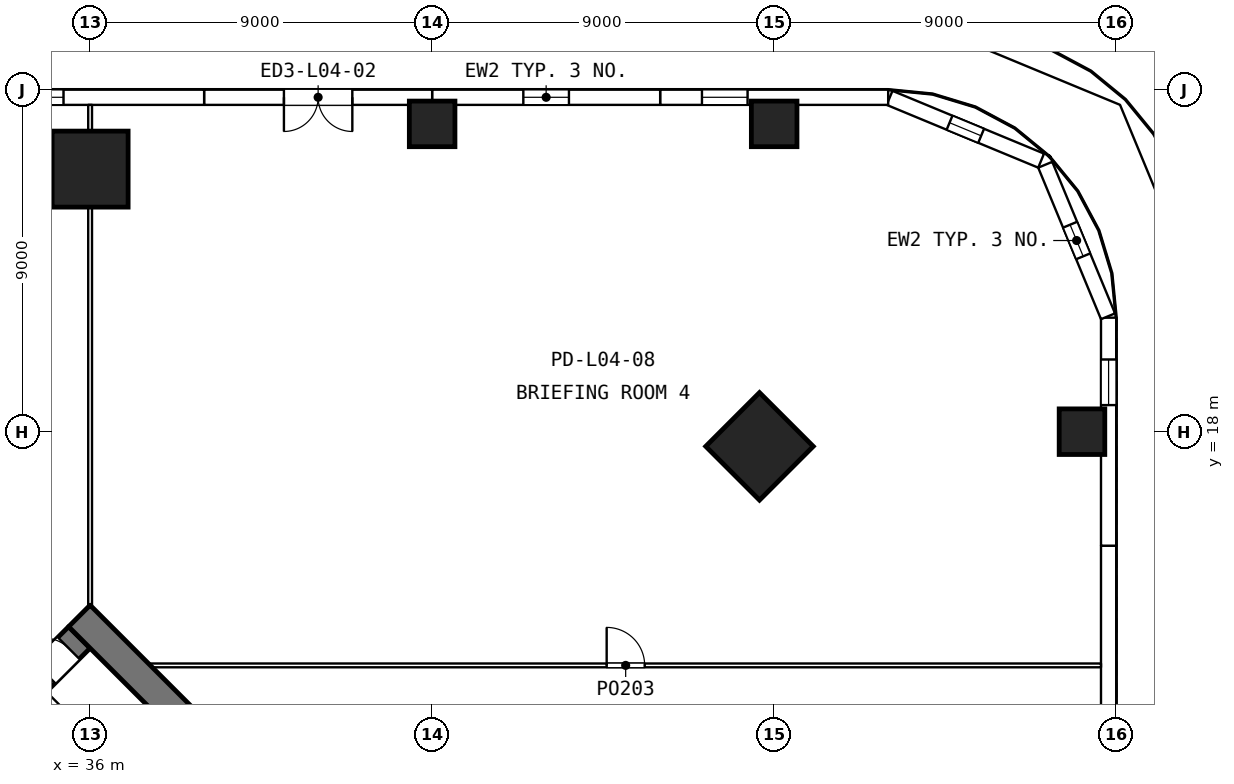
"""IFC4 building model, lengths in metres.
Left out: names, types, materials, properties, quantities, classifications, styles, units other than length and angle.
Written with IfcOpenShell. Run it as: python <this file> out.ifc"""

import sys

from ifc_helpers import new_model, si_unit, direction, frame, frame_2d, origin, origin_2d, place, context, subcontext, project, spatial, rectangle, extrude, element, fill, save


model = new_model("IFC4")
c1 = context("Model", 3, precision=1e-05, world=origin(), true_north=direction((0.0, 1.0)))
c2 = subcontext(c1, "Body", "Model", "MODEL_VIEW")
j1 = project(units=[si_unit("LENGTHUNIT", "METRE"), si_unit("PLANEANGLEUNIT", "RADIAN")], contexts=[c1])
p1 = place(None, origin())
s1 = spatial("IfcSite", under=j1, at=p1, CompositionType="ELEMENT")
p2 = place(p1, origin())
s2 = spatial("IfcBuilding", under=s1, at=p2, CompositionType="ELEMENT")
p3 = place(p2, frame((0.0, 0.0, 22.8)))
s3 = spatial("IfcBuildingStorey", under=s2, at=p3, CompositionType="ELEMENT", Elevation=22.8)
for number, where, z_axis, x_axis in (
    (1, (45.0, 26.1, 0.0), (0.0, 0.0, 1.0), (1.0, 0.0, 0.0)),
    (2, (54.0, 26.1, 0.0), (0.0, 0.0, 1.0), (1.0, 0.0, 0.0)),
    (3, (62.1, 18.0, 0.0), (0.0, 0.0, 1.0), (1.0, 0.0, 0.0)),
):
    element("IfcColumn", number, at=place(p3, frame(where, z_axis=z_axis, x_axis=x_axis)), inside=s3, PredefinedType="COLUMN", context=c2, shape_type="SweptSolid", body=[
        extrude(rectangle(XDim=1.2, YDim=1.2, at=origin_2d()), origin(), (0.0, 0.0, 1.0), 4.8),
    ])
for number, where, z_axis, x_axis in (
    (4, (53.614, 17.614, 0.0), (0.0, 0.0, 1.0), (0.707, 0.707, 0.0)),
    (5, (36.0, 24.91, 0.0), (0.0, 0.0, 1.0), (0.0, 1.0, 0.0)),
):
    element("IfcColumn", number, at=place(p3, frame(where, z_axis=z_axis, x_axis=x_axis)), inside=s3, PredefinedType="COLUMN", context=c2, shape_type="SweptSolid", body=[
        extrude(rectangle(XDim=2.0, YDim=2.0, at=origin_2d()), origin(), (0.0, 0.0, 1.0), 4.8),
    ])
p4 = place(p3, frame((62.8, 9.0, 0.0), z_axis=(0.0, 0.0, 1.0), x_axis=(0.0, 1.0, 0.0)))
e6 = element("IfcWall", 6, at=p4, inside=s3, PredefinedType="SOLIDWALL", context=c2, shape_type="SweptSolid", body=[
    extrude(rectangle(XDim=6.0, YDim=0.4, at=frame_2d((3.0, 0.0))), origin(), (0.0, 0.0, 1.0), 4.5),
])
p5 = place(p3, frame((62.8, 15.0, 0.0), z_axis=(0.0, 0.0, 1.0), x_axis=(0.0, 1.0, 0.0)))
e7 = element("IfcWall", 7, at=p5, inside=s3, PredefinedType="SOLIDWALL", context=c2, shape_type="SweptSolid", body=[
    extrude(rectangle(XDim=6.0, YDim=0.4, at=frame_2d((3.0, 0.0))), origin(), (0.0, 0.0, 1.0), 4.5),
])
p6 = place(p5, frame((3.7, 0.0, 1.1)))
e8 = element("IfcOpeningElement", 8, at=p6, cuts=e7, PredefinedType="OPENING", context=c2, shape_type="SweptSolid", body=[
    extrude(rectangle(XDim=1.2, YDim=1.8, at=frame_2d((0.6, 0.9))), frame((0.0, 0.21, 0.0), z_axis=(0.0, -1.0, 0.0), x_axis=(1.0, 0.0, 0.0)), (0.0, 0.0, 1.0), 0.42),
])
p7 = place(p3, frame((62.785, 21.037, 0.0), z_axis=(0.0, 0.0, 1.0), x_axis=(-0.382743086333, 0.923854820772, 0.0)))
e9 = element("IfcWall", 9, at=p7, inside=s3, PredefinedType="SOLIDWALL", context=c2, shape_type="SweptSolid", body=[
    extrude(rectangle(XDim=4.316, YDim=0.4, at=frame_2d((2.158, 0.0))), origin(), (0.0, 0.0, 1.0), 4.5),
])
p8 = place(p7, frame((1.708, 0.0, 1.0)))
e10 = element("IfcOpeningElement", 10, at=p8, cuts=e9, PredefinedType="OPENING", context=c2, shape_type="SweptSolid", body=[
    extrude(rectangle(XDim=0.9, YDim=2.4, at=frame_2d((0.45, 1.2))), frame((0.0, 0.21, 0.0), z_axis=(0.0, -1.0, 0.0), x_axis=(1.0, 0.0, 0.0)), (0.0, 0.0, 1.0), 0.42),
])
p9 = place(p3, frame((61.025, 25.133, 0.0), z_axis=(0.0, 0.0, 1.0), x_axis=(-0.923854820772, 0.382743086333, 0.0)))
e11 = element("IfcWall", 11, at=p9, inside=s3, PredefinedType="SOLIDWALL", context=c2, shape_type="SweptSolid", body=[
    extrude(rectangle(XDim=4.316, YDim=0.4, at=frame_2d((2.158, 0.0))), origin(), (0.0, 0.0, 1.0), 4.5),
])
p10 = place(p9, frame((1.708, 0.0, 1.0)))
e12 = element("IfcOpeningElement", 12, at=p10, cuts=e11, PredefinedType="OPENING", context=c2, shape_type="SweptSolid", body=[
    extrude(rectangle(XDim=0.9, YDim=2.4, at=frame_2d((0.45, 1.2))), frame((0.0, 0.21, 0.0), z_axis=(0.0, -1.0, 0.0), x_axis=(1.0, 0.0, 0.0)), (0.0, 0.0, 1.0), 0.42),
])
p11 = place(p3, frame((57.0, 26.8, 0.0), z_axis=(0.0, 0.0, 1.0), x_axis=(-1.0, 0.0, 0.0)))
e13 = element("IfcWall", 13, at=p11, inside=s3, PredefinedType="SOLIDWALL", context=c2, shape_type="SweptSolid", body=[
    extrude(rectangle(XDim=6.0, YDim=0.4, at=frame_2d((3.0, 0.0))), origin(), (0.0, 0.0, 1.0), 4.5),
])
p12 = place(p11, frame((3.7, 0.0, 1.1)))
e14 = element("IfcOpeningElement", 14, at=p12, cuts=e13, PredefinedType="OPENING", context=c2, shape_type="SweptSolid", body=[
    extrude(rectangle(XDim=1.2, YDim=1.8, at=frame_2d((0.6, 0.9))), frame((0.0, 0.21, 0.0), z_axis=(0.0, -1.0, 0.0), x_axis=(1.0, 0.0, 0.0)), (0.0, 0.0, 1.0), 0.42),
])
p13 = place(p3, frame((51.0, 26.8, 0.0), z_axis=(0.0, 0.0, 1.0), x_axis=(-1.0, 0.0, 0.0)))
e15 = element("IfcWall", 15, at=p13, inside=s3, PredefinedType="SOLIDWALL", context=c2, shape_type="SweptSolid", body=[
    extrude(rectangle(XDim=6.0, YDim=0.4, at=frame_2d((3.0, 0.0))), origin(), (0.0, 0.0, 1.0), 4.5),
])
p14 = place(p13, frame((2.4, 0.0, 1.1)))
e16 = element("IfcOpeningElement", 16, at=p14, cuts=e15, PredefinedType="OPENING", context=c2, shape_type="SweptSolid", body=[
    extrude(rectangle(XDim=1.2, YDim=1.8, at=frame_2d((0.6, 0.9))), frame((0.0, 0.21, 0.0), z_axis=(0.0, -1.0, 0.0), x_axis=(1.0, 0.0, 0.0)), (0.0, 0.0, 1.0), 0.42),
])
p15 = place(p3, frame((45.0, 26.8, 0.0), z_axis=(0.0, 0.0, 1.0), x_axis=(-1.0, 0.0, 0.0)))
e17 = element("IfcWall", 17, at=p15, inside=s3, PredefinedType="SOLIDWALL", context=c2, shape_type="SweptSolid", body=[
    extrude(rectangle(XDim=6.0, YDim=0.4, at=frame_2d((3.0, 0.0))), origin(), (0.0, 0.0, 1.0), 4.5),
])
p16 = place(p15, frame((2.1, 0.0, 0.0)))
e18 = element("IfcOpeningElement", 18, at=p16, cuts=e17, PredefinedType="OPENING", context=c2, shape_type="SweptSolid", body=[
    extrude(rectangle(XDim=1.8, YDim=2.4, at=frame_2d((0.9, 1.2))), frame((0.0, 0.21, 0.0), z_axis=(0.0, -1.0, 0.0), x_axis=(1.0, 0.0, 0.0)), (0.0, 0.0, 1.0), 0.42),
])
p17 = place(p3, frame((39.0, 26.8, 0.0), z_axis=(0.0, 0.0, 1.0), x_axis=(-1.0, 0.0, 0.0)))
e19 = element("IfcWall", 19, at=p17, inside=s3, PredefinedType="SOLIDWALL", context=c2, shape_type="SweptSolid", body=[
    extrude(rectangle(XDim=6.0, YDim=0.4, at=frame_2d((3.0, 0.0))), origin(), (0.0, 0.0, 1.0), 4.5),
])
p18 = place(p17, frame((3.7, 0.0, 1.1)))
e20 = element("IfcOpeningElement", 20, at=p18, cuts=e19, PredefinedType="OPENING", context=c2, shape_type="SweptSolid", body=[
    extrude(rectangle(XDim=1.2, YDim=1.8, at=frame_2d((0.6, 0.9))), frame((0.0, 0.21, 0.0), z_axis=(0.0, -1.0, 0.0), x_axis=(1.0, 0.0, 0.0)), (0.0, 0.0, 1.0), 0.42),
])
p19 = place(p3, frame((23.414, 0.283, 0.0), z_axis=(0.0, 0.0, 1.0), x_axis=(0.707106781187, 0.707106781187, 0.0)))
e21 = element("IfcWall", 21, at=p19, inside=s3, PredefinedType="SHEAR", context=c2, shape_type="SweptSolid", body=[
    extrude(rectangle(XDim=17.4, YDim=0.8, at=frame_2d((8.7, 0.0))), origin(), (0.0, 0.0, 1.0), 4.5),
])
p20 = place(p19, frame((8.9, 0.0, 0.0)))
e22 = element("IfcOpeningElement", 22, at=p20, cuts=e21, PredefinedType="OPENING", context=c2, shape_type="SweptSolid", body=[
    extrude(rectangle(XDim=1.2, YDim=2.1, at=frame_2d((0.6, 1.05))), frame((0.0, 0.41, 0.0), z_axis=(0.0, -1.0, 0.0), x_axis=(1.0, 0.0, 0.0)), (0.0, 0.0, 1.0), 0.82),
])
p21 = place(p19, frame((14.6, 0.0, 0.0)))
e23 = element("IfcOpeningElement", 23, at=p21, cuts=e21, PredefinedType="OPENING", context=c2, shape_type="SweptSolid", body=[
    extrude(rectangle(XDim=0.9, YDim=2.1, at=frame_2d((0.45, 1.05))), frame((0.0, 0.41, 0.0), z_axis=(0.0, -1.0, 0.0), x_axis=(1.0, 0.0, 0.0)), (0.0, 0.0, 1.0), 0.82),
])
p22 = place(p19, frame((16.1, 0.0, 0.0)))
e24 = element("IfcOpeningElement", 24, at=p22, cuts=e21, PredefinedType="OPENING", context=c2, shape_type="SweptSolid", body=[
    extrude(rectangle(XDim=0.9, YDim=2.1, at=frame_2d((0.45, 1.05))), frame((0.0, 0.41, 0.0), z_axis=(0.0, -1.0, 0.0), x_axis=(1.0, 0.0, 0.0)), (0.0, 0.0, 1.0), 0.82),
])
p23 = place(p3, frame((37.503, 8.397, 0.0), z_axis=(0.0, 0.0, 1.0), x_axis=(-0.707138693938, 0.707074866995, 0.0)))
e25 = element("IfcWall", 25, at=p23, inside=s3, PredefinedType="PARTITIONING", context=c2, shape_type="SweptSolid", body=[
    extrude(rectangle(XDim=3.825, YDim=0.15, at=frame_2d((1.913, 0.0))), origin(), (0.0, 0.0, 1.0), 4.5),
])
p24 = place(p3, frame((49.152, -0.283, 0.0), z_axis=(0.0, 0.0, 1.0), x_axis=(-0.707106781187, 0.707106781187, 0.0)))
e26 = element("IfcWall", 26, at=p24, inside=s3, PredefinedType="SHEAR", context=c2, shape_type="SweptSolid", body=[
    extrude(rectangle(XDim=19.0, YDim=0.8, at=frame_2d((9.5, 0.0))), origin(), (0.0, 0.0, 1.0), 4.5),
])
p25 = place(p24, frame((8.3, 0.0, 0.0)))
e27 = element("IfcOpeningElement", 27, at=p25, cuts=e26, PredefinedType="OPENING", context=c2, shape_type="SweptSolid", body=[
    extrude(rectangle(XDim=2.4, YDim=2.1, at=frame_2d((1.2, 1.05))), frame((0.0, 0.41, 0.0), z_axis=(0.0, -1.0, 0.0), x_axis=(1.0, 0.0, 0.0)), (0.0, 0.0, 1.0), 0.82),
])
p26 = place(p3, frame((36.0, 13.435, 0.0), z_axis=(0.0, 0.0, 1.0), x_axis=(0.0, 1.0, 0.0)))
e28 = element("IfcWall", 28, at=p26, inside=s3, PredefinedType="PARTITIONING", context=c2, shape_type="SweptSolid", body=[
    extrude(rectangle(XDim=13.165, YDim=0.1, at=frame_2d((6.583, 0.0))), origin(), (0.0, 0.0, 1.0), 3.9),
])
p27 = place(p3, frame((37.585, 11.85, 0.0), z_axis=(0.0, 0.0, 1.0), x_axis=(1.0, 0.0, 0.0)))
e29 = element("IfcWall", 29, at=p27, inside=s3, PredefinedType="PARTITIONING", context=c2, shape_type="SweptSolid", body=[
    extrude(rectangle(XDim=25.015, YDim=0.1, at=frame_2d((12.508, 0.0))), origin(), (0.0, 0.0, 1.0), 4.5),
])
p28 = place(p27, frame((12.008, 0.0, 0.0)))
e30 = element("IfcOpeningElement", 30, at=p28, cuts=e29, PredefinedType="OPENING", context=c2, shape_type="SweptSolid", body=[
    extrude(rectangle(XDim=1.0, YDim=2.1, at=frame_2d((0.5, 1.05))), frame((0.0, 0.06, 0.0), z_axis=(0.0, -1.0, 0.0), x_axis=(1.0, 0.0, 0.0)), (0.0, 0.0, 1.0), 0.12),
])
p29 = place(p6, origin())
e31 = element("IfcWindow", 31, at=p29, inside=s3, PartitioningType="SINGLE_PANEL", PredefinedType="WINDOW", context=c2, shape_type="SweptSolid", body=[
    extrude(rectangle(XDim=1.2, YDim=1.8, at=frame_2d((0.6, 0.9))), frame((0.0, 0.03, 0.0), z_axis=(0.0, -1.0, 0.0), x_axis=(1.0, 0.0, 0.0)), (0.0, 0.0, 1.0), 0.06),
])
fill(e8, e31)
p30 = place(p8, origin())
e32 = element("IfcWindow", 32, at=p30, inside=s3, PartitioningType="SINGLE_PANEL", PredefinedType="WINDOW", context=c2, shape_type="SweptSolid", body=[
    extrude(rectangle(XDim=0.9, YDim=2.4, at=frame_2d((0.45, 1.2))), frame((0.0, 0.03, 0.0), z_axis=(0.0, -1.0, 0.0), x_axis=(1.0, 0.0, 0.0)), (0.0, 0.0, 1.0), 0.06),
])
fill(e10, e32)
p31 = place(p10, origin())
e33 = element("IfcWindow", 33, at=p31, inside=s3, PartitioningType="SINGLE_PANEL", PredefinedType="WINDOW", context=c2, shape_type="SweptSolid", body=[
    extrude(rectangle(XDim=0.9, YDim=2.4, at=frame_2d((0.45, 1.2))), frame((0.0, 0.03, 0.0), z_axis=(0.0, -1.0, 0.0), x_axis=(1.0, 0.0, 0.0)), (0.0, 0.0, 1.0), 0.06),
])
fill(e12, e33)
p32 = place(p12, origin())
e34 = element("IfcWindow", 34, at=p32, inside=s3, PartitioningType="SINGLE_PANEL", PredefinedType="WINDOW", context=c2, shape_type="SweptSolid", body=[
    extrude(rectangle(XDim=1.2, YDim=1.8, at=frame_2d((0.6, 0.9))), frame((0.0, 0.03, 0.0), z_axis=(0.0, -1.0, 0.0), x_axis=(1.0, 0.0, 0.0)), (0.0, 0.0, 1.0), 0.06),
])
fill(e14, e34)
p33 = place(p14, origin())
e35 = element("IfcWindow", 35, at=p33, inside=s3, PartitioningType="SINGLE_PANEL", PredefinedType="WINDOW", context=c2, shape_type="SweptSolid", body=[
    extrude(rectangle(XDim=1.2, YDim=1.8, at=frame_2d((0.6, 0.9))), frame((0.0, 0.03, 0.0), z_axis=(0.0, -1.0, 0.0), x_axis=(1.0, 0.0, 0.0)), (0.0, 0.0, 1.0), 0.06),
])
fill(e16, e35)
p34 = place(p16, origin())
e36 = element("IfcDoor", 36, at=p34, inside=s3, OperationType="SINGLE_SWING_LEFT", PredefinedType="DOOR", context=c2, shape_type="SweptSolid", body=[
    extrude(rectangle(XDim=1.8, YDim=2.4, at=frame_2d((0.9, 1.2))), frame((0.0, 0.025, 0.0), z_axis=(0.0, -1.0, 0.0), x_axis=(1.0, 0.0, 0.0)), (0.0, 0.0, 1.0), 0.05),
])
fill(e18, e36)
p35 = place(p18, origin())
e37 = element("IfcWindow", 37, at=p35, inside=s3, PartitioningType="SINGLE_PANEL", PredefinedType="WINDOW", context=c2, shape_type="SweptSolid", body=[
    extrude(rectangle(XDim=1.2, YDim=1.8, at=frame_2d((0.6, 0.9))), frame((0.0, 0.03, 0.0), z_axis=(0.0, -1.0, 0.0), x_axis=(1.0, 0.0, 0.0)), (0.0, 0.0, 1.0), 0.06),
])
fill(e20, e37)
p36 = place(p22, origin())
e38 = element("IfcDoor", 38, at=p36, inside=s3, OperationType="SINGLE_SWING_LEFT", PredefinedType="DOOR", context=c2, shape_type="SweptSolid", body=[
    extrude(rectangle(XDim=0.9, YDim=2.1, at=frame_2d((0.45, 1.05))), frame((0.0, -0.225, 0.0), z_axis=(0.0, -1.0, 0.0), x_axis=(1.0, 0.0, 0.0)), (0.0, 0.0, 1.0), 0.05),
])
fill(e24, e38)
p37 = place(p28, origin())
e39 = element("IfcDoor", 39, at=p37, inside=s3, OperationType="SINGLE_SWING_LEFT", PredefinedType="DOOR", context=c2, shape_type="SweptSolid", body=[
    extrude(rectangle(XDim=1.0, YDim=2.1, at=frame_2d((0.5, 1.05))), frame((0.0, 0.025, 0.0), z_axis=(0.0, -1.0, 0.0), x_axis=(1.0, 0.0, 0.0)), (0.0, 0.0, 1.0), 0.05),
])
fill(e30, e39)
save(model, sys.argv[1])
